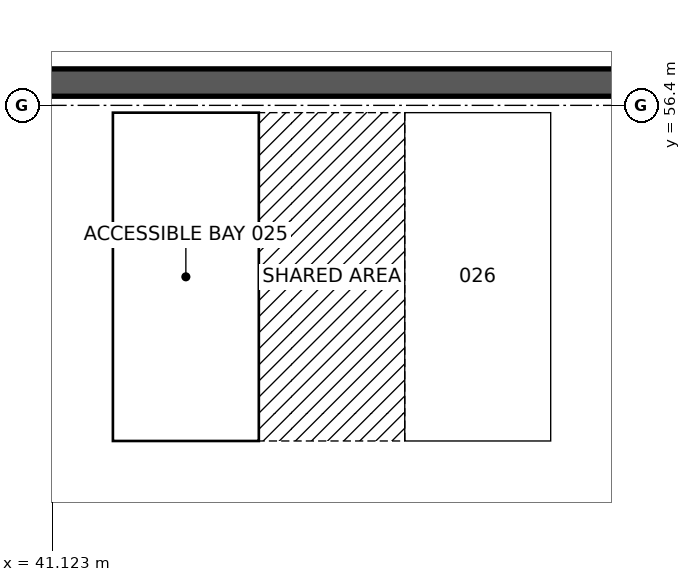
"""IFC4 building model, lengths in metres.
Left out: names, types, materials, properties, quantities, classifications, styles, units other than length and angle.
Written with IfcOpenShell. Run it as: python <this file> out.ifc"""

import sys

from ifc_helpers import new_model, si_unit, direction, frame, frame_2d, origin, place, context, subcontext, project, spatial, rectangle, extrude, element, save


model = new_model("IFC4")
c1 = context("Model", 3, precision=1e-05, world=origin(), true_north=direction((0.0, 1.0)))
c2 = subcontext(c1, "Body", "Model", "MODEL_VIEW")
j1 = project(units=[si_unit("LENGTHUNIT", "METRE"), si_unit("PLANEANGLEUNIT", "RADIAN")], contexts=[c1])
p1 = place(None, origin())
s1 = spatial("IfcSite", under=j1, at=p1, CompositionType="ELEMENT")
p2 = place(p1, origin())
s2 = spatial("IfcBuilding", under=s1, at=p2, CompositionType="ELEMENT")
p3 = place(p2, frame((0.0, 0.0, -7.4)))
s3 = spatial("IfcBuildingStorey", under=s2, at=p3, CompositionType="ELEMENT", Elevation=-7.4)
p4 = place(p3, frame((78.0, 56.775, -0.4), z_axis=(0.0, 0.0, 1.0), x_axis=(-1.0, 0.0, 0.0)))
e1 = element("IfcWall", 1, at=p4, inside=s3, PredefinedType="SHEAR", context=c2, shape_type="SweptSolid", body=[
    extrude(rectangle(XDim=76.0, YDim=0.45, at=frame_2d((38.0, 0.0))), origin(), (0.0, 0.0, 1.0), 4.1),
])
save(model, sys.argv[1])
